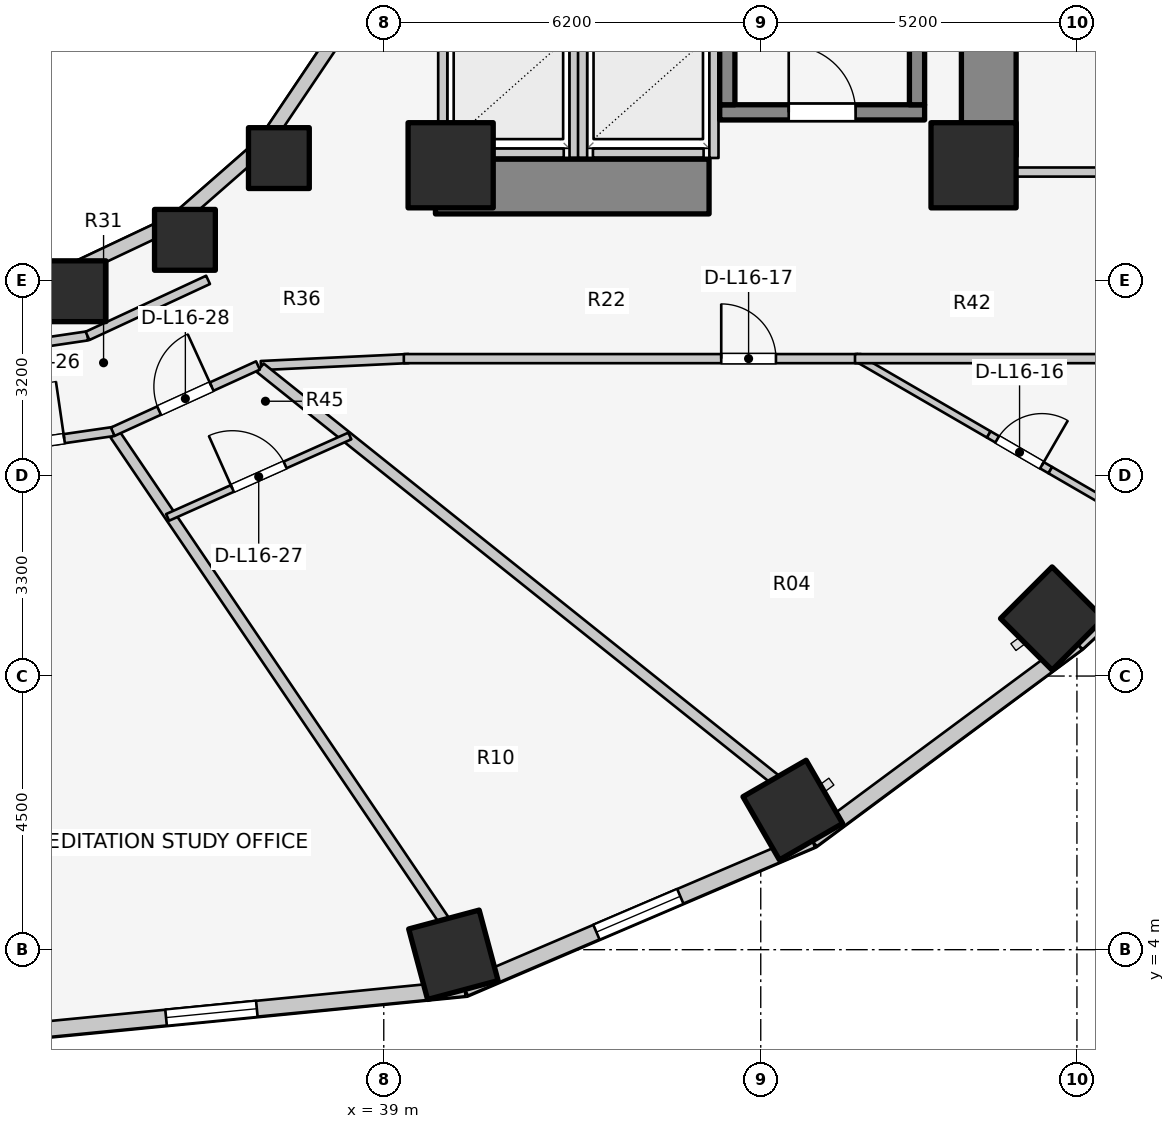
"""IFC4 building model, lengths in metres.
Left out: names, types, materials, properties, quantities, classifications, styles, units other than length and angle.
Written with IfcOpenShell. Run it as: python <this file> out.ifc"""

import sys

from ifc_helpers import new_model, si_unit, direction, frame, frame_2d, origin, origin_2d, place, context, subcontext, project, spatial, rectangle, extrude, element, fill, save


model = new_model("IFC4")
c1 = context("Model", 3, precision=1e-05, world=origin(), true_north=direction((0.0, 1.0)))
c2 = subcontext(c1, "Body", "Model", "MODEL_VIEW")
j1 = project(units=[si_unit("LENGTHUNIT", "METRE"), si_unit("PLANEANGLEUNIT", "RADIAN")], contexts=[c1])
p1 = place(None, origin())
s1 = spatial("IfcSite", under=j1, at=p1, CompositionType="ELEMENT")
p2 = place(p1, origin())
s2 = spatial("IfcBuilding", under=s1, at=p2, CompositionType="ELEMENT")
p3 = place(p2, frame((0.0, 0.0, 55.5)))
s3 = spatial("IfcBuildingStorey", under=s2, at=p3, CompositionType="ELEMENT", Elevation=55.5)
p4 = place(p3, frame((48.95, 17.05, 0.0), z_axis=(0.0, 0.0, 1.0), x_axis=(0.0, 1.0, 0.0)))
e1 = element("IfcWall", 1, at=p4, inside=s3, PredefinedType="SHEAR", context=c2, shape_type="SweptSolid", body=[
    extrude(rectangle(XDim=12.8, YDim=0.9, at=frame_2d((6.4, 0.0))), origin(), (0.0, 0.0, 1.0), 3.1),
])
p5 = place(p3, frame((39.85, 16.55, 0.0), z_axis=(0.0, 0.0, 1.0), x_axis=(1.0, 0.0, 0.0)))
e2 = element("IfcWall", 2, at=p5, inside=s3, PredefinedType="SHEAR", context=c2, shape_type="SweptSolid", body=[
    extrude(rectangle(XDim=4.5, YDim=0.9, at=frame_2d((2.25, 0.0))), origin(), (0.0, 0.0, 1.0), 3.1),
])
p6 = place(p3, frame((44.525, 17.77, 0.0), z_axis=(0.0, 0.0, 1.0), x_axis=(1.0, 0.0, 0.0)))
e3 = element("IfcWall", 3, at=p6, inside=s3, PredefinedType="SOLIDWALL", context=c2, shape_type="SweptSolid", body=[
    extrude(rectangle(XDim=3.37, YDim=0.25, at=frame_2d((1.685, 0.0))), origin(), (0.0, 0.0, 1.0), 3.1),
])
p7 = place(p6, frame((1.135, 0.0, 0.0)))
e4 = element("IfcOpeningElement", 4, at=p7, cuts=e3, PredefinedType="OPENING", context=c2, shape_type="SweptSolid", body=[
    extrude(rectangle(XDim=1.1, YDim=2.1, at=frame_2d((0.55, 1.05))), frame((0.0, 0.135, 0.0), z_axis=(0.0, -1.0, 0.0), x_axis=(1.0, 0.0, 0.0)), (0.0, 0.0, 1.0), 0.27),
])
for number, where, z_axis, x_axis in (
    (5, (44.65, 17.895, 0.0), (0.0, 0.0, 1.0), (0.0, 1.0, 0.0)),
    (6, (47.77, 17.895, 0.0), (0.0, 0.0, 1.0), (0.0, 1.0, 0.0)),
):
    element("IfcWall", number, at=place(p3, frame(where, z_axis=z_axis, x_axis=x_axis)), inside=s3, PredefinedType="SOLIDWALL", context=c2, shape_type="SweptSolid", body=[
        extrude(rectangle(XDim=7.81, YDim=0.25, at=frame_2d((3.905, 0.0))), origin(), (0.0, 0.0, 1.0), 3.1),
    ])
for number, where, z_axis, x_axis in (
    (7, (40.1, 16.9, 0.0), (0.0, 0.0, 1.0), (1.0, 0.0, 0.0)),
    (8, (48.7, 16.9, 0.0), (0.0, 0.0, 1.0), (1.0, 0.0, 0.0)),
):
    element("IfcColumn", number, at=place(p3, frame(where, z_axis=z_axis, x_axis=x_axis)), inside=s3, PredefinedType="COLUMN", context=c2, shape_type="SweptSolid", body=[
        extrude(rectangle(XDim=1.4, YDim=1.4, at=origin_2d()), origin(), (0.0, 0.0, 1.0), 3.1),
    ])
p8 = place(p3, frame((33.931, 14.828, 0.0), z_axis=(0.0, 0.0, 1.0), x_axis=(1.0, 0.0, 0.0)))
e9 = element("IfcColumn", 9, at=p8, inside=s3, PredefinedType="COLUMN", context=c2, shape_type="SweptSolid", body=[
    extrude(rectangle(XDim=1.0, YDim=1.0, at=origin_2d()), origin(), (0.0, 0.0, 1.0), 3.1),
])
p9 = place(p3, frame((40.145, 3.916, 0.0), z_axis=(0.0, 0.0, 1.0), x_axis=(0.258819045103, -0.965925826289, 0.0)))
e10 = element("IfcColumn", 10, at=p9, inside=s3, PredefinedType="COLUMN", context=c2, shape_type="SweptSolid", body=[
    extrude(rectangle(XDim=1.2, YDim=1.2, at=origin_2d()), origin(), (0.0, 0.0, 1.0), 3.1),
])
p10 = place(p3, frame((35.73, 15.673, 0.0), z_axis=(0.0, 0.0, 1.0), x_axis=(1.0, 0.0, 0.0)))
e11 = element("IfcColumn", 11, at=p10, inside=s3, PredefinedType="COLUMN", context=c2, shape_type="SweptSolid", body=[
    extrude(rectangle(XDim=1.0, YDim=1.0, at=origin_2d()), origin(), (0.0, 0.0, 1.0), 3.1),
])
p11 = place(p3, frame((45.727, 6.296, 0.0), z_axis=(0.0, 0.0, 1.0), x_axis=(0.5, -0.866025403784, 0.0)))
e12 = element("IfcColumn", 12, at=p11, inside=s3, PredefinedType="COLUMN", context=c2, shape_type="SweptSolid", body=[
    extrude(rectangle(XDim=1.2, YDim=1.2, at=origin_2d()), origin(), (0.0, 0.0, 1.0), 3.1),
])
p12 = place(p3, frame((37.275, 17.018, 0.0), z_axis=(0.0, 0.0, 1.0), x_axis=(1.0, 0.0, 0.0)))
e13 = element("IfcColumn", 13, at=p12, inside=s3, PredefinedType="COLUMN", context=c2, shape_type="SweptSolid", body=[
    extrude(rectangle(XDim=1.0, YDim=1.0, at=origin_2d()), origin(), (0.0, 0.0, 1.0), 3.1),
])
p13 = place(p3, frame((49.992, 9.446, 0.0), z_axis=(0.0, 0.0, 1.0), x_axis=(0.707106781187, -0.707106781187, 0.0)))
e14 = element("IfcColumn", 14, at=p13, inside=s3, PredefinedType="COLUMN", context=c2, shape_type="SweptSolid", body=[
    extrude(rectangle(XDim=1.2, YDim=1.2, at=origin_2d()), origin(), (0.0, 0.0, 1.0), 3.1),
])
p14 = place(p3, frame((32.0, 14.88, 0.0), z_axis=(0.0, 0.0, 1.0), x_axis=(0.988901730308, 0.148571086668, 0.0)))
e15 = element("IfcWall", 15, at=p14, inside=s3, PredefinedType="STANDARD", context=c2, shape_type="SweptSolid", body=[
    extrude(rectangle(XDim=1.864, YDim=0.23, at=frame_2d((0.932, 0.0))), origin(), (0.0, 0.0, 1.0), 2.16),
])
p15 = place(p3, frame((33.843, 15.157, 0.0), z_axis=(0.0, 0.0, 1.0), x_axis=(0.904179699603, 0.427152280606, 0.0)))
e16 = element("IfcWall", 16, at=p15, inside=s3, PredefinedType="STANDARD", context=c2, shape_type="SweptSolid", body=[
    extrude(rectangle(XDim=1.899, YDim=0.23, at=frame_2d((0.95, 0.0))), origin(), (0.0, 0.0, 1.0), 2.16),
])
p16 = place(p3, frame((35.56, 15.968, 0.0), z_axis=(0.0, 0.0, 1.0), x_axis=(0.752576694707, 0.658504607869, 0.0)))
e17 = element("IfcWall", 17, at=p16, inside=s3, PredefinedType="STANDARD", context=c2, shape_type="SweptSolid", body=[
    extrude(rectangle(XDim=1.959, YDim=0.23, at=frame_2d((0.98, 0.0))), origin(), (0.0, 0.0, 1.0), 2.16),
])
p17 = place(p3, frame((37.035, 17.258, 0.0), z_axis=(0.0, 0.0, 1.0), x_axis=(0.558197800898, 0.829707909492, 0.0)))
e18 = element("IfcWall", 18, at=p17, inside=s3, PredefinedType="STANDARD", context=c2, shape_type="SweptSolid", body=[
    extrude(rectangle(XDim=2.027, YDim=0.23, at=frame_2d((1.013, 0.0))), origin(), (0.0, 0.0, 1.0), 2.16),
])
p18 = place(p3, frame((32.0, 2.549, 0.0), z_axis=(0.0, 0.0, 1.0), x_axis=(0.995247718352, 0.097375454379, 0.0)))
e19 = element("IfcWall", 19, at=p18, inside=s3, PredefinedType="STANDARD", context=c2, shape_type="SweptSolid", body=[
    extrude(rectangle(XDim=8.372, YDim=0.26, at=frame_2d((4.186, 0.0))), origin(), (0.0, 0.0, 1.0), 2.85),
])
p19 = place(p18, frame((3.436, 0.0, 0.75)))
e20 = element("IfcOpeningElement", 20, at=p19, cuts=e19, PredefinedType="OPENING", context=c2, shape_type="SweptSolid", body=[
    extrude(rectangle(XDim=1.5, YDim=1.6, at=frame_2d((0.75, 0.8))), frame((0.0, 0.14, 0.0), z_axis=(0.0, -1.0, 0.0), x_axis=(1.0, 0.0, 0.0)), (0.0, 0.0, 1.0), 0.28),
])
p20 = place(p3, frame((40.332, 3.364, 0.0), z_axis=(0.0, 0.0, 1.0), x_axis=(0.919612132394, 0.39282760335, 0.0)))
e21 = element("IfcWall", 21, at=p20, inside=s3, PredefinedType="STANDARD", context=c2, shape_type="SweptSolid", body=[
    extrude(rectangle(XDim=6.209, YDim=0.26, at=frame_2d((3.105, 0.0))), origin(), (0.0, 0.0, 1.0), 2.85),
])
p21 = place(p20, frame((2.355, 0.0, 0.75)))
e22 = element("IfcOpeningElement", 22, at=p21, cuts=e21, PredefinedType="OPENING", context=c2, shape_type="SweptSolid", body=[
    extrude(rectangle(XDim=1.5, YDim=1.6, at=frame_2d((0.75, 0.8))), frame((0.0, 0.14, 0.0), z_axis=(0.0, -1.0, 0.0), x_axis=(1.0, 0.0, 0.0)), (0.0, 0.0, 1.0), 0.28),
])
p22 = place(p3, frame((46.042, 5.803, 0.0), z_axis=(0.0, 0.0, 1.0), x_axis=(0.803477531792, 0.595335078679, 0.0)))
e23 = element("IfcWall", 23, at=p22, inside=s3, PredefinedType="STANDARD", context=c2, shape_type="SweptSolid", body=[
    extrude(rectangle(XDim=5.43, YDim=0.26, at=frame_2d((2.715, 0.0))), origin(), (0.0, 0.0, 1.0), 2.85),
])
p23 = place(p3, frame((50.405, 9.035, 0.0), z_axis=(0.0, 0.0, 1.0), x_axis=(0.735655109293, 0.67735630223, 0.0)))
e24 = element("IfcWall", 24, at=p23, inside=s3, PredefinedType="STANDARD", context=c2, shape_type="SweptSolid", body=[
    extrude(rectangle(XDim=5.151, YDim=0.26, at=frame_2d((2.575, 0.0))), origin(), (0.0, 0.0, 1.0), 2.85),
])
p24 = place(p23, frame((3.125, 0.0, 0.75)))
e25 = element("IfcOpeningElement", 25, at=p24, cuts=e24, PredefinedType="OPENING", context=c2, shape_type="SweptSolid", body=[
    extrude(rectangle(XDim=1.2, YDim=1.5, at=frame_2d((0.6, 0.75))), frame((0.0, 0.14, 0.0), z_axis=(0.0, -1.0, 0.0), x_axis=(1.0, 0.0, 0.0)), (0.0, 0.0, 1.0), 0.28),
])
p25 = place(p3, frame((40.14, 17.1, 0.0), z_axis=(0.0, 0.0, 1.0), x_axis=(1.0, 0.0, 0.0)))
e26 = element("IfcWall", 26, at=p25, inside=s3, PredefinedType="SOLIDWALL", context=c2, shape_type="SweptSolid", body=[
    extrude(rectangle(XDim=1.82, YDim=0.15, at=frame_2d((0.91, 0.0))), origin(), (0.0, 0.0, 1.0), 2.12),
])
p26 = place(p3, frame((39.97, 17.02, 0.0), z_axis=(0.0, 0.0, 1.0), x_axis=(0.0, 1.0, 0.0)))
e27 = element("IfcWall", 27, at=p26, inside=s3, PredefinedType="SOLIDWALL", context=c2, shape_type="SweptSolid", body=[
    extrude(rectangle(XDim=2.22, YDim=0.15, at=frame_2d((1.11, 0.0))), origin(), (0.0, 0.0, 1.0), 2.12),
])
p27 = place(p3, frame((42.13, 17.02, 0.0), z_axis=(0.0, 0.0, 1.0), x_axis=(0.0, 1.0, 0.0)))
e28 = element("IfcWall", 28, at=p27, inside=s3, PredefinedType="SOLIDWALL", context=c2, shape_type="SweptSolid", body=[
    extrude(rectangle(XDim=2.22, YDim=0.15, at=frame_2d((1.11, 0.0))), origin(), (0.0, 0.0, 1.0), 2.855),
])
p28 = place(p3, frame((42.44, 17.1, 0.0), z_axis=(0.0, 0.0, 1.0), x_axis=(1.0, 0.0, 0.0)))
e29 = element("IfcWall", 29, at=p28, inside=s3, PredefinedType="SOLIDWALL", context=c2, shape_type="SweptSolid", body=[
    extrude(rectangle(XDim=1.82, YDim=0.15, at=frame_2d((0.91, 0.0))), origin(), (0.0, 0.0, 1.0), 2.855),
])
p29 = place(p3, frame((42.27, 17.02, 0.0), z_axis=(0.0, 0.0, 1.0), x_axis=(0.0, 1.0, 0.0)))
e30 = element("IfcWall", 30, at=p29, inside=s3, PredefinedType="SOLIDWALL", context=c2, shape_type="SweptSolid", body=[
    extrude(rectangle(XDim=2.22, YDim=0.15, at=frame_2d((1.11, 0.0))), origin(), (0.0, 0.0, 1.0), 2.855),
])
p30 = place(p3, frame((44.43, 17.02, 0.0), z_axis=(0.0, 0.0, 1.0), x_axis=(0.0, 1.0, 0.0)))
e31 = element("IfcWall", 31, at=p30, inside=s3, PredefinedType="SOLIDWALL", context=c2, shape_type="SweptSolid", body=[
    extrude(rectangle(XDim=2.22, YDim=0.15, at=frame_2d((1.11, 0.0))), origin(), (0.0, 0.0, 1.0), 2.12),
])
p31 = place(p3, frame((32.0, 13.78, 0.0), z_axis=(0.0, 0.0, 1.0), x_axis=(0.989268584896, 0.146108408166, 0.0)))
e32 = element("IfcWall", 32, at=p31, inside=s3, PredefinedType="PARTITIONING", context=c2, shape_type="SweptSolid", body=[
    extrude(rectangle(XDim=2.151, YDim=0.15, at=frame_2d((1.075, 0.0))), origin(), (0.0, 0.0, 1.0), 2.237),
])
p32 = place(p3, frame((34.127, 14.094, 0.0), z_axis=(0.0, 0.0, 1.0), x_axis=(0.906943449489, 0.421252393975, 0.0)))
e33 = element("IfcWall", 33, at=p32, inside=s3, PredefinedType="PARTITIONING", context=c2, shape_type="SweptSolid", body=[
    extrude(rectangle(XDim=2.186, YDim=0.15, at=frame_2d((1.093, 0.0))), origin(), (0.0, 0.0, 1.0), 2.237),
])
p33 = place(p3, frame((48.95, 16.788, 0.0), z_axis=(0.0, 0.0, 1.0), x_axis=(1.0, 0.0, 0.0)))
e34 = element("IfcWall", 34, at=p33, inside=s3, PredefinedType="PARTITIONING", context=c2, shape_type="SweptSolid", body=[
    extrude(rectangle(XDim=2.793, YDim=0.15, at=frame_2d((1.396, 0.0))), origin(), (0.0, 0.0, 1.0), 2.069),
])
p34 = place(p3, frame((46.757, 13.745, 0.0), z_axis=(0.0, 0.0, 1.0), x_axis=(0.865085506202, -0.501624428193, 0.0)))
e35 = element("IfcWall", 35, at=p34, inside=s3, PredefinedType="MOVABLE", context=c2, shape_type="SweptSolid", body=[
    extrude(rectangle(XDim=2.536, YDim=0.12, at=frame_2d((1.268, 0.0))), origin(), (0.0, 0.0, 1.0), 2.855),
])
p35 = place(p3, frame((48.95, 12.473, 0.0), z_axis=(0.0, 0.0, 1.0), x_axis=(0.865092761915, -0.501611915013, 0.0)))
e36 = element("IfcWall", 36, at=p35, inside=s3, PredefinedType="MOVABLE", context=c2, shape_type="SweptSolid", body=[
    extrude(rectangle(XDim=1.17, YDim=0.12, at=frame_2d((0.585, 0.0))), origin(), (0.0, 0.0, 1.0), 2.11),
])
p36 = place(p35, frame((0.16, 0.0, 0.0)))
e37 = element("IfcOpeningElement", 37, at=p36, cuts=e36, PredefinedType="OPENING", context=c2, shape_type="SweptSolid", body=[
    extrude(rectangle(XDim=0.85, YDim=2.05, at=frame_2d((0.425, 1.025))), frame((0.0, 0.07, 0.0), z_axis=(0.0, -1.0, 0.0), x_axis=(1.0, 0.0, 0.0)), (0.0, 0.0, 1.0), 0.14),
])
p37 = place(p3, frame((49.962, 11.886, 0.0), z_axis=(0.0, 0.0, 1.0), x_axis=(0.865085506202, -0.501624428193, 0.0)))
e38 = element("IfcWall", 38, at=p37, inside=s3, PredefinedType="MOVABLE", context=c2, shape_type="SweptSolid", body=[
    extrude(rectangle(XDim=2.536, YDim=0.12, at=frame_2d((1.268, 0.0))), origin(), (0.0, 0.0, 1.0), 2.855),
])
p38 = place(p3, frame((36.98, 13.606, 0.0), z_axis=(0.0, 0.0, 1.0), x_axis=(0.998877427952, 0.047369651964, 0.0)))
e39 = element("IfcWall", 39, at=p38, inside=s3, PredefinedType="PARTITIONING", context=c2, shape_type="SweptSolid", body=[
    extrude(rectangle(XDim=2.433, YDim=0.15, at=frame_2d((1.216, 0.0))), origin(), (0.0, 0.0, 1.0), 2.237),
])
p39 = place(p3, frame((39.33, 13.72, 0.0), z_axis=(0.0, 0.0, 1.0), x_axis=(1.0, 0.0, 0.0)))
e40 = element("IfcWall", 40, at=p39, inside=s3, PredefinedType="PARTITIONING", context=c2, shape_type="SweptSolid", body=[
    extrude(rectangle(XDim=7.52, YDim=0.15, at=frame_2d((3.76, 0.0))), origin(), (0.0, 0.0, 1.0), 2.237),
])
p40 = place(p39, frame((5.22, 0.0, 0.0)))
e41 = element("IfcOpeningElement", 41, at=p40, cuts=e40, PredefinedType="OPENING", context=c2, shape_type="SweptSolid", body=[
    extrude(rectangle(XDim=0.9, YDim=2.1, at=frame_2d((0.45, 1.05))), frame((0.0, 0.085, 0.0), z_axis=(0.0, -1.0, 0.0), x_axis=(1.0, 0.0, 0.0)), (0.0, 0.0, 1.0), 0.17),
])
p41 = place(p3, frame((46.75, 13.72, 0.0), z_axis=(0.0, 0.0, 1.0), x_axis=(1.0, 0.0, 0.0)))
e42 = element("IfcWall", 42, at=p41, inside=s3, PredefinedType="PARTITIONING", context=c2, shape_type="SweptSolid", body=[
    extrude(rectangle(XDim=5.05, YDim=0.15, at=frame_2d((2.525, 0.0))), origin(), (0.0, 0.0, 1.0), 2.069),
])
p42 = place(p3, frame((34.58, 12.474, 0.0), z_axis=(0.0, 0.0, 1.0), x_axis=(0.560641882674, -0.828058379217, 0.0)))
e43 = element("IfcWall", 43, at=p42, inside=s3, PredefinedType="PARTITIONING", context=c2, shape_type="SweptSolid", body=[
    extrude(rectangle(XDim=9.658, YDim=0.18, at=frame_2d((4.829, 0.0))), origin(), (0.0, 0.0, 1.0), 2.237),
])
p43 = place(p3, frame((36.968, 13.569, 0.0), z_axis=(0.0, 0.0, 1.0), x_axis=(0.781055486744, -0.624461629428, 0.0)))
e44 = element("IfcWall", 44, at=p43, inside=s3, PredefinedType="PARTITIONING", context=c2, shape_type="SweptSolid", body=[
    extrude(rectangle(XDim=10.843, YDim=0.18, at=frame_2d((5.422, 0.0))), origin(), (0.0, 0.0, 1.0), 2.237),
])
p44 = place(p3, frame((31.993, 12.15, 0.0), z_axis=(0.0, 0.0, 1.0), x_axis=(0.989637894688, 0.143585644814, 0.0)))
e45 = element("IfcWall", 45, at=p44, inside=s3, PredefinedType="PARTITIONING", context=c2, shape_type="SweptSolid", body=[
    extrude(rectangle(XDim=2.59, YDim=0.15, at=frame_2d((1.295, 0.0))), origin(), (0.0, 0.0, 1.0), 2.237),
])
p45 = place(p44, frame((0.82, 0.0, 0.0)))
e46 = element("IfcOpeningElement", 46, at=p45, cuts=e45, PredefinedType="OPENING", context=c2, shape_type="SweptSolid", body=[
    extrude(rectangle(XDim=0.95, YDim=2.1, at=frame_2d((0.475, 1.05))), frame((0.0, 0.085, 0.0), z_axis=(0.0, -1.0, 0.0), x_axis=(1.0, 0.0, 0.0)), (0.0, 0.0, 1.0), 0.17),
])
p46 = place(p3, frame((35.445, 11.109, 0.0), z_axis=(0.0, 0.0, 1.0), x_axis=(0.913036999281, 0.407876743569, 0.0)))
e47 = element("IfcWall", 47, at=p46, inside=s3, PredefinedType="MOVABLE", context=c2, shape_type="SweptSolid", body=[
    extrude(rectangle(XDim=3.282, YDim=0.12, at=frame_2d((1.641, 0.0))), origin(), (0.0, 0.0, 1.0), 2.237),
])
p47 = place(p46, frame((1.166, 0.0, 0.0)))
e48 = element("IfcOpeningElement", 48, at=p47, cuts=e47, PredefinedType="OPENING", context=c2, shape_type="SweptSolid", body=[
    extrude(rectangle(XDim=0.95, YDim=2.1, at=frame_2d((0.475, 1.05))), frame((0.0, 0.07, 0.0), z_axis=(0.0, -1.0, 0.0), x_axis=(1.0, 0.0, 0.0)), (0.0, 0.0, 1.0), 0.14),
])
p48 = place(p3, frame((34.543, 12.518, 0.0), z_axis=(0.0, 0.0, 1.0), x_axis=(0.909747571199, 0.415161843982, 0.0)))
e49 = element("IfcWall", 49, at=p48, inside=s3, PredefinedType="PARTITIONING", context=c2, shape_type="SweptSolid", body=[
    extrude(rectangle(XDim=2.625, YDim=0.15, at=frame_2d((1.312, 0.0))), origin(), (0.0, 0.0, 1.0), 2.237),
])
p49 = place(p48, frame((0.838, 0.0, 0.0)))
e50 = element("IfcOpeningElement", 50, at=p49, cuts=e49, PredefinedType="OPENING", context=c2, shape_type="SweptSolid", body=[
    extrude(rectangle(XDim=0.95, YDim=2.1, at=frame_2d((0.475, 1.05))), frame((0.0, 0.085, 0.0), z_axis=(0.0, -1.0, 0.0), x_axis=(1.0, 0.0, 0.0)), (0.0, 0.0, 1.0), 0.17),
])
p50 = place(p19, origin())
e51 = element("IfcWindow", 51, at=p50, inside=s3, PartitioningType="SINGLE_PANEL", PredefinedType="WINDOW", context=c2, shape_type="SweptSolid", body=[
    extrude(rectangle(XDim=1.5, YDim=1.6, at=frame_2d((0.75, 0.8))), frame((0.0, 0.03, 0.0), z_axis=(0.0, -1.0, 0.0), x_axis=(1.0, 0.0, 0.0)), (0.0, 0.0, 1.0), 0.06),
])
fill(e20, e51)
p51 = place(p21, origin())
e52 = element("IfcWindow", 52, at=p51, inside=s3, PartitioningType="SINGLE_PANEL", PredefinedType="WINDOW", context=c2, shape_type="SweptSolid", body=[
    extrude(rectangle(XDim=1.5, YDim=1.6, at=frame_2d((0.75, 0.8))), frame((0.0, 0.03, 0.0), z_axis=(0.0, -1.0, 0.0), x_axis=(1.0, 0.0, 0.0)), (0.0, 0.0, 1.0), 0.06),
])
fill(e22, e52)
p52 = place(p7, origin())
e53 = element("IfcDoor", 53, at=p52, inside=s3, OperationType="SINGLE_SWING_LEFT", PredefinedType="DOOR", context=c2, shape_type="SweptSolid", body=[
    extrude(rectangle(XDim=1.1, YDim=2.1, at=frame_2d((0.55, 1.05))), frame((0.0, 0.025, 0.0), z_axis=(0.0, -1.0, 0.0), x_axis=(1.0, 0.0, 0.0)), (0.0, 0.0, 1.0), 0.05),
])
fill(e4, e53)
p53 = place(p36, origin())
e54 = element("IfcDoor", 54, at=p53, inside=s3, OperationType="SINGLE_SWING_RIGHT", PredefinedType="DOOR", context=c2, shape_type="SweptSolid", body=[
    extrude(rectangle(XDim=0.85, YDim=2.05, at=frame_2d((0.425, 1.025))), frame((0.0, 0.025, 0.0), z_axis=(0.0, -1.0, 0.0), x_axis=(1.0, 0.0, 0.0)), (0.0, 0.0, 1.0), 0.05),
])
fill(e37, e54)
p54 = place(p40, origin())
e55 = element("IfcDoor", 55, at=p54, inside=s3, OperationType="SINGLE_SWING_LEFT", PredefinedType="DOOR", context=c2, shape_type="SweptSolid", body=[
    extrude(rectangle(XDim=0.9, YDim=2.1, at=frame_2d((0.45, 1.05))), frame((0.0, 0.025, 0.0), z_axis=(0.0, -1.0, 0.0), x_axis=(1.0, 0.0, 0.0)), (0.0, 0.0, 1.0), 0.05),
])
fill(e41, e55)
p55 = place(p45, origin())
e56 = element("IfcDoor", 56, at=p55, inside=s3, OperationType="SINGLE_SWING_RIGHT", PredefinedType="DOOR", context=c2, shape_type="SweptSolid", body=[
    extrude(rectangle(XDim=0.95, YDim=2.1, at=frame_2d((0.475, 1.05))), frame((0.0, 0.025, 0.0), z_axis=(0.0, -1.0, 0.0), x_axis=(1.0, 0.0, 0.0)), (0.0, 0.0, 1.0), 0.05),
])
fill(e46, e56)
p56 = place(p47, origin())
e57 = element("IfcDoor", 57, at=p56, inside=s3, OperationType="SINGLE_SWING_LEFT", PredefinedType="DOOR", context=c2, shape_type="SweptSolid", body=[
    extrude(rectangle(XDim=0.95, YDim=2.1, at=frame_2d((0.475, 1.05))), frame((0.0, 0.025, 0.0), z_axis=(0.0, -1.0, 0.0), x_axis=(1.0, 0.0, 0.0)), (0.0, 0.0, 1.0), 0.05),
])
fill(e48, e57)
p57 = place(p49, origin())
e58 = element("IfcDoor", 58, at=p57, inside=s3, OperationType="SINGLE_SWING_RIGHT", PredefinedType="DOOR", context=c2, shape_type="SweptSolid", body=[
    extrude(rectangle(XDim=0.95, YDim=2.1, at=frame_2d((0.475, 1.05))), frame((0.0, 0.025, 0.0), z_axis=(0.0, -1.0, 0.0), x_axis=(1.0, 0.0, 0.0)), (0.0, 0.0, 1.0), 0.05),
])
fill(e50, e58)
save(model, sys.argv[1])
